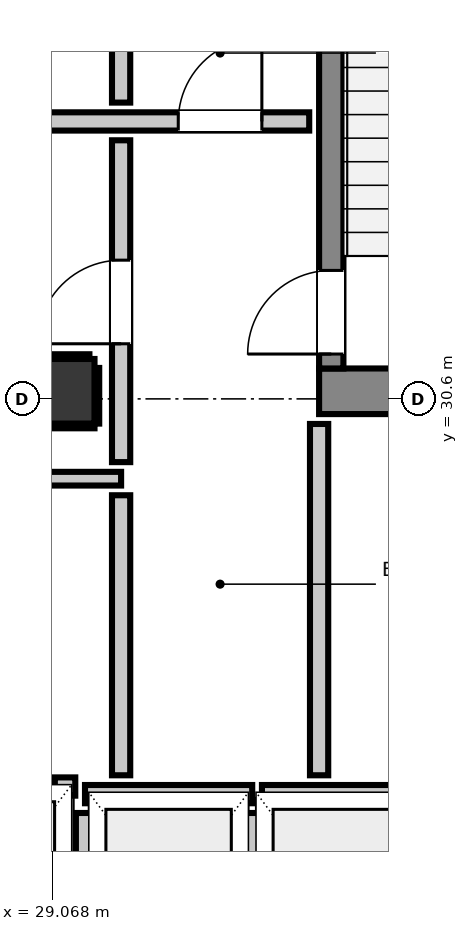
"""IFC4 building model, lengths in metres.
Left out: names, types, materials, properties, quantities, classifications, styles, units other than length and angle.
Written with IfcOpenShell. Run it as: python <this file> out.ifc"""

import sys

from ifc_helpers import new_model, si_unit, direction, frame, frame_2d, origin, origin_2d, place, context, subcontext, project, spatial, rectangle, extrude, element, fill, save


model = new_model("IFC4")
c1 = context("Model", 3, precision=1e-05, world=origin(), true_north=direction((0.0, 1.0)))
c2 = subcontext(c1, "Body", "Model", "MODEL_VIEW")
j1 = project(units=[si_unit("LENGTHUNIT", "METRE"), si_unit("PLANEANGLEUNIT", "RADIAN")], contexts=[c1])
p1 = place(None, origin())
s1 = spatial("IfcSite", under=j1, at=p1, CompositionType="ELEMENT")
p2 = place(p1, origin())
s2 = spatial("IfcBuilding", under=s1, at=p2, CompositionType="ELEMENT")
p3 = place(p2, frame((0.0, 0.0, 172.48)))
s3 = spatial("IfcBuildingStorey", under=s2, at=p3, CompositionType="ELEMENT", Elevation=172.48)
p4 = place(p3, frame((32.58, 30.7, 0.0), z_axis=(0.0, 0.0, 1.0), x_axis=(1.0, 0.0, 0.0)))
e1 = element("IfcWall", 1, at=p4, inside=s3, PredefinedType="SHEAR", context=c2, shape_type="SweptSolid", body=[
    extrude(rectangle(XDim=3.54, YDim=0.6, at=frame_2d((1.77, 0.0))), origin(), (0.0, 0.0, 1.0), 4.4),
])
p5 = place(p3, frame((32.74, 31.0, 0.0), z_axis=(0.0, 0.0, 1.0), x_axis=(0.0, 1.0, 0.0)))
e2 = element("IfcWall", 2, at=p5, inside=s3, PredefinedType="SHEAR", context=c2, shape_type="SweptSolid", body=[
    extrude(rectangle(XDim=7.8, YDim=0.32, at=frame_2d((3.9, 0.0))), origin(), (0.0, 0.0, 1.0), 4.4),
])
p6 = place(p5, frame((0.19, 0.0, 0.0)))
e3 = element("IfcOpeningElement", 3, at=p6, cuts=e2, PredefinedType="OPENING", context=c2, shape_type="SweptSolid", body=[
    extrude(rectangle(XDim=1.1, YDim=2.15, at=frame_2d((0.55, 1.075))), frame((0.0, 0.17, 0.0), z_axis=(0.0, -1.0, 0.0), x_axis=(1.0, 0.0, 0.0)), (0.0, 0.0, 1.0), 0.34),
])
p7 = place(p3, frame((29.2, 30.7, 0.0), z_axis=(0.0, 0.0, 1.0), x_axis=(1.0, 0.0, 0.0)))
e4 = element("IfcColumn", 4, at=p7, inside=s3, PredefinedType="COLUMN", context=c2, shape_type="SweptSolid", body=[
    extrude(rectangle(XDim=0.85, YDim=0.85, at=origin_2d()), origin(), (0.0, 0.0, 1.0), 4.4),
])
p8 = place(p3, frame((29.5, 25.4, 0.0), z_axis=(0.0, 0.0, 1.0), x_axis=(1.0, 0.0, 0.0)))
e5 = element("IfcWall", 5, at=p8, inside=s3, PredefinedType="PARTITIONING", context=c2, shape_type="SweptSolid", body=[
    extrude(rectangle(XDim=2.2, YDim=0.24, at=frame_2d((1.1, 0.0))), origin(), (0.0, 0.0, 1.0), 4.16),
])
p9 = place(p3, frame((29.5, 22.848, 0.0), z_axis=(0.0, 0.0, 1.0), x_axis=(0.0, 1.0, 0.0)))
e6 = element("IfcWall", 6, at=p9, inside=s3, PredefinedType="PARTITIONING", context=c2, shape_type="SweptSolid", body=[
    extrude(rectangle(XDim=2.304, YDim=0.24, at=frame_2d((1.152, 0.0))), origin(), (0.0, 0.0, 1.0), 3.395),
])
p10 = place(p3, frame((31.7, 22.848, 0.0), z_axis=(0.0, 0.0, 1.0), x_axis=(0.0, 1.0, 0.0)))
e7 = element("IfcWall", 7, at=p10, inside=s3, PredefinedType="PARTITIONING", context=c2, shape_type="SweptSolid", body=[
    extrude(rectangle(XDim=2.304, YDim=0.24, at=frame_2d((1.152, 0.0))), origin(), (0.0, 0.0, 1.0), 4.16),
])
p11 = place(p3, frame((31.828, 25.4, 0.0), z_axis=(0.0, 0.0, 1.0), x_axis=(1.0, 0.0, 0.0)))
e8 = element("IfcWall", 8, at=p11, inside=s3, PredefinedType="PARTITIONING", context=c2, shape_type="SweptSolid", body=[
    extrude(rectangle(XDim=2.072, YDim=0.24, at=frame_2d((1.036, 0.0))), origin(), (0.0, 0.0, 1.0), 4.16),
])
p12 = place(p3, frame((29.103, 25.5, 0.0), z_axis=(0.0, 0.0, 1.0), x_axis=(1.0, 0.0, 0.0)))
e9 = element("IfcWall", 9, at=p12, inside=s3, PredefinedType="PARTITIONING", context=c2, shape_type="SweptSolid", body=[
    extrude(rectangle(XDim=0.269, YDim=0.24, at=frame_2d((0.135, 0.0))), origin(), (0.0, 0.0, 1.0), 4.16),
])
p13 = place(p3, frame((28.56, 34.25, 0.0), z_axis=(0.0, 0.0, 1.0), x_axis=(1.0, 0.0, 0.0)))
e10 = element("IfcWall", 10, at=p13, inside=s3, PredefinedType="PARTITIONING", context=c2, shape_type="SweptSolid", body=[
    extrude(rectangle(XDim=3.89, YDim=0.24, at=frame_2d((1.945, 0.0))), origin(), (0.0, 0.0, 1.0), 4.16),
])
p14 = place(p13, frame((2.167, 0.0, 0.0)))
e11 = element("IfcOpeningElement", 11, at=p14, cuts=e10, PredefinedType="OPENING", context=c2, shape_type="SweptSolid", body=[
    extrude(rectangle(XDim=1.1, YDim=2.15, at=frame_2d((0.55, 1.075))), frame((0.0, 0.13, 0.0), z_axis=(0.0, -1.0, 0.0), x_axis=(1.0, 0.0, 0.0)), (0.0, 0.0, 1.0), 0.26),
])
p15 = place(p3, frame((28.593, 29.55, 0.0), z_axis=(0.0, 0.0, 1.0), x_axis=(1.0, 0.0, 0.0)))
e12 = element("IfcWall", 12, at=p15, inside=s3, PredefinedType="PARTITIONING", context=c2, shape_type="SweptSolid", body=[
    extrude(rectangle(XDim=1.382, YDim=0.18, at=frame_2d((0.691, 0.0))), origin(), (0.0, 0.0, 1.0), 4.16),
])
p16 = place(p3, frame((29.975, 25.648, 0.0), z_axis=(0.0, 0.0, 1.0), x_axis=(0.0, 1.0, 0.0)))
e13 = element("IfcWall", 13, at=p16, inside=s3, PredefinedType="PARTITIONING", context=c2, shape_type="SweptSolid", body=[
    extrude(rectangle(XDim=3.684, YDim=0.24, at=frame_2d((1.842, 0.0))), origin(), (0.0, 0.0, 1.0), 4.16),
])
p17 = place(p3, frame((29.975, 29.768, 0.0), z_axis=(0.0, 0.0, 1.0), x_axis=(0.0, 1.0, 0.0)))
e14 = element("IfcWall", 14, at=p17, inside=s3, PredefinedType="PARTITIONING", context=c2, shape_type="SweptSolid", body=[
    extrude(rectangle(XDim=4.234, YDim=0.24, at=frame_2d((2.117, 0.0))), origin(), (0.0, 0.0, 1.0), 4.16),
])
p18 = place(p17, frame((1.557, 0.0, 0.0)))
e15 = element("IfcOpeningElement", 15, at=p18, cuts=e14, PredefinedType="OPENING", context=c2, shape_type="SweptSolid", body=[
    extrude(rectangle(XDim=1.1, YDim=2.15, at=frame_2d((0.55, 1.075))), frame((0.0, 0.13, 0.0), z_axis=(0.0, -1.0, 0.0), x_axis=(1.0, 0.0, 0.0)), (0.0, 0.0, 1.0), 0.26),
])
p19 = place(p3, frame((29.975, 34.498, 0.0), z_axis=(0.0, 0.0, 1.0), x_axis=(0.0, 1.0, 0.0)))
e16 = element("IfcWall", 16, at=p19, inside=s3, PredefinedType="PARTITIONING", context=c2, shape_type="SweptSolid", body=[
    extrude(rectangle(XDim=0.924, YDim=0.24, at=frame_2d((0.462, 0.0))), origin(), (0.0, 0.0, 1.0), 4.16),
])
p20 = place(p3, frame((32.58, 25.648, 0.0), z_axis=(0.0, 0.0, 1.0), x_axis=(0.0, 1.0, 0.0)))
e17 = element("IfcWall", 17, at=p20, inside=s3, PredefinedType="PARTITIONING", context=c2, shape_type="SweptSolid", body=[
    extrude(rectangle(XDim=4.622, YDim=0.24, at=frame_2d((2.311, 0.0))), origin(), (0.0, 0.0, 1.0), 4.16),
])
p21 = place(p3, frame((28.775, 30.243, 0.0), z_axis=(0.0, 0.0, 1.0), x_axis=(1.0, 0.0, 0.0)))
e18 = element("IfcWall", 18, at=p21, inside=s3, PredefinedType="PARTITIONING", context=c2, shape_type="SweptSolid", body=[
    extrude(rectangle(XDim=0.85, YDim=0.06, at=frame_2d((0.425, 0.0))), origin(), (0.0, 0.0, 1.0), 1.45),
])
p22 = place(p3, frame((28.775, 31.157, 0.0), z_axis=(0.0, 0.0, 1.0), x_axis=(1.0, 0.0, 0.0)))
e19 = element("IfcWall", 19, at=p22, inside=s3, PredefinedType="PARTITIONING", context=c2, shape_type="SweptSolid", body=[
    extrude(rectangle(XDim=0.783, YDim=0.06, at=frame_2d((0.392, 0.0))), origin(), (0.0, 0.0, 1.0), 1.45),
])
p23 = place(p3, frame((29.657, 30.275, 0.0), z_axis=(0.0, 0.0, 1.0), x_axis=(0.0, 1.0, 0.0)))
e20 = element("IfcWall", 20, at=p23, inside=s3, PredefinedType="PARTITIONING", context=c2, shape_type="SweptSolid", body=[
    extrude(rectangle(XDim=0.732, YDim=0.06, at=frame_2d((0.366, 0.0))), origin(), (0.0, 0.0, 1.0), 1.45),
])
p24 = place(p6, origin())
e21 = element("IfcDoor", 21, at=p24, inside=s3, OperationType="SINGLE_SWING_LEFT", PredefinedType="DOOR", context=c2, shape_type="SweptSolid", body=[
    extrude(rectangle(XDim=1.1, YDim=2.15, at=frame_2d((0.55, 1.075))), frame((0.0, 0.025, 0.0), z_axis=(0.0, -1.0, 0.0), x_axis=(1.0, 0.0, 0.0)), (0.0, 0.0, 1.0), 0.05),
])
fill(e3, e21)
p25 = place(p18, origin())
e22 = element("IfcDoor", 22, at=p25, inside=s3, OperationType="SINGLE_SWING_LEFT", PredefinedType="DOOR", context=c2, shape_type="SweptSolid", body=[
    extrude(rectangle(XDim=1.1, YDim=2.15, at=frame_2d((0.55, 1.075))), frame((0.0, 0.025, 0.0), z_axis=(0.0, -1.0, 0.0), x_axis=(1.0, 0.0, 0.0)), (0.0, 0.0, 1.0), 0.05),
])
fill(e15, e22)
p26 = place(p14, origin())
e23 = element("IfcDoor", 23, at=p26, inside=s3, OperationType="SINGLE_SWING_RIGHT", PredefinedType="DOOR", context=c2, shape_type="SweptSolid", body=[
    extrude(rectangle(XDim=1.1, YDim=2.15, at=frame_2d((0.55, 1.075))), frame((0.0, 0.025, 0.0), z_axis=(0.0, -1.0, 0.0), x_axis=(1.0, 0.0, 0.0)), (0.0, 0.0, 1.0), 0.05),
])
fill(e11, e23)
save(model, sys.argv[1])
